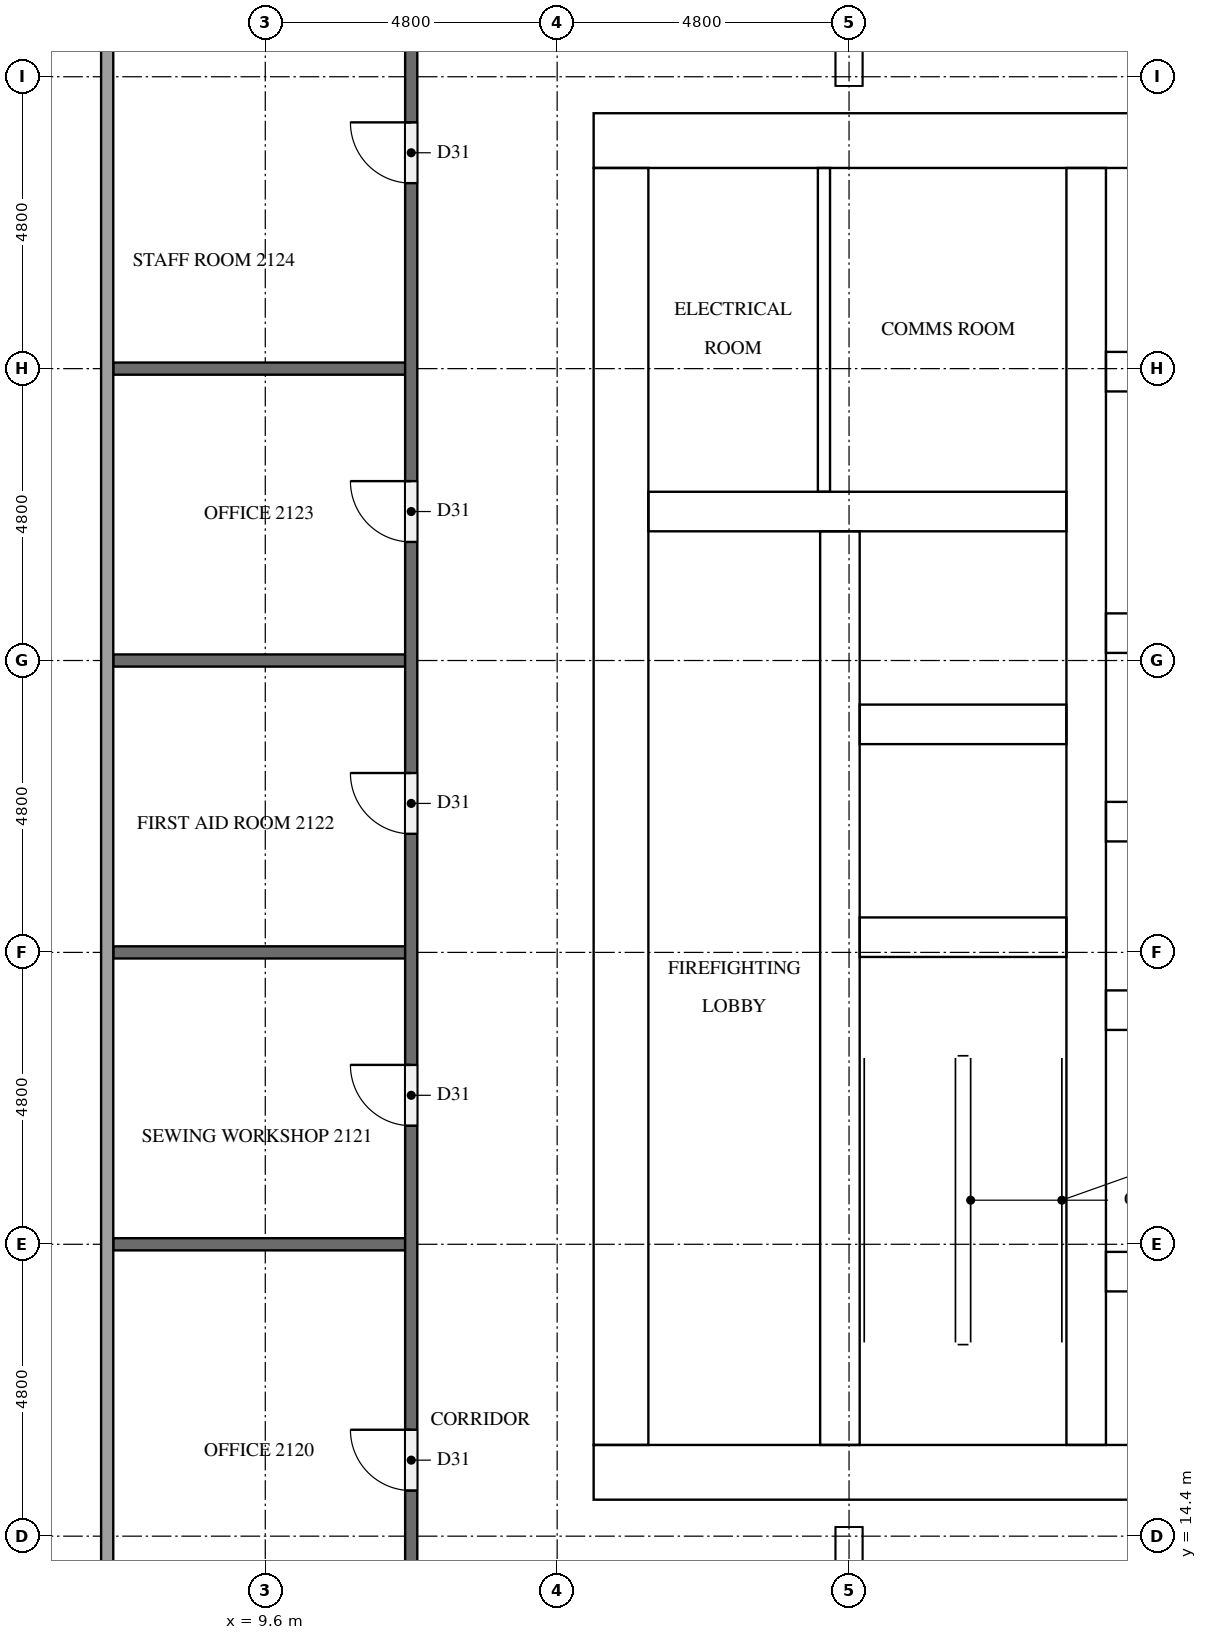
"""IFC4 building model, lengths in metres.
Left out: names, types, materials, properties, quantities, classifications, styles, units other than length and angle.
Written with IfcOpenShell. Run it as: python <this file> out.ifc"""

import sys

from ifc_helpers import new_model, si_unit, direction, frame, frame_2d, origin, place, context, subcontext, project, spatial, rectangle, extrude, element, fill, save


model = new_model("IFC4")
c1 = context("Model", 3, precision=1e-05, world=origin(), true_north=direction((0.0, 1.0)))
c2 = subcontext(c1, "Body", "Model", "MODEL_VIEW")
j1 = project(units=[si_unit("LENGTHUNIT", "METRE"), si_unit("PLANEANGLEUNIT", "RADIAN")], contexts=[c1])
p1 = place(None, origin())
s1 = spatial("IfcSite", under=j1, at=p1, CompositionType="ELEMENT")
p2 = place(p1, origin())
s2 = spatial("IfcBuilding", under=s1, at=p2, CompositionType="ELEMENT")
p3 = place(p2, frame((0.0, 0.0, 83.8)))
s3 = spatial("IfcBuildingStorey", under=s2, at=p3, CompositionType="ELEMENT", Elevation=83.8)
p4 = place(p3, frame((15.0, 15.45, 0.0), z_axis=(0.0, 0.0, 1.0), x_axis=(1.0, 0.0, 0.0)))
e1 = element("IfcWall", 1, at=p4, inside=s3, PredefinedType="SHEAR", context=c2, shape_type="SweptSolid", body=[
    extrude(rectangle(XDim=32.4, YDim=0.9, at=frame_2d((16.2, 0.0))), origin(), (0.0, 0.0, 1.0), 5.1),
])
p5 = place(p4, frame((15.3, 0.0, 0.0)))
e2 = element("IfcOpeningElement", 2, at=p5, cuts=e1, PredefinedType="OPENING", context=c2, shape_type="SweptSolid", body=[
    extrude(rectangle(XDim=1.8, YDim=2.1, at=frame_2d((0.9, 1.05))), frame((0.0, 0.46, 0.0), z_axis=(0.0, -1.0, 0.0), x_axis=(1.0, 0.0, 0.0)), (0.0, 0.0, 1.0), 0.92),
])
p6 = place(p3, frame((15.0, 37.35, 0.0), z_axis=(0.0, 0.0, 1.0), x_axis=(1.0, 0.0, 0.0)))
e3 = element("IfcWall", 3, at=p6, inside=s3, PredefinedType="SHEAR", context=c2, shape_type="SweptSolid", body=[
    extrude(rectangle(XDim=32.4, YDim=0.9, at=frame_2d((16.2, 0.0))), origin(), (0.0, 0.0, 1.0), 5.1),
])
p7 = place(p6, frame((15.3, 0.0, 0.0)))
e4 = element("IfcOpeningElement", 4, at=p7, cuts=e3, PredefinedType="OPENING", context=c2, shape_type="SweptSolid", body=[
    extrude(rectangle(XDim=1.8, YDim=2.1, at=frame_2d((0.9, 1.05))), frame((0.0, 0.46, 0.0), z_axis=(0.0, -1.0, 0.0), x_axis=(1.0, 0.0, 0.0)), (0.0, 0.0, 1.0), 0.92),
])
p8 = place(p6, frame((1.794, 0.0, 0.0)))
e5 = element("IfcOpeningElement", 5, at=p8, cuts=e3, PredefinedType="OPENING", context=c2, shape_type="SweptSolid", body=[
    extrude(rectangle(XDim=1.0, YDim=2.1, at=frame_2d((0.5, 1.05))), frame((0.0, 0.46, 0.0), z_axis=(0.0, -1.0, 0.0), x_axis=(1.0, 0.0, 0.0)), (0.0, 0.0, 1.0), 0.92),
])
p9 = place(p6, frame((5.331, 0.0, 0.0)))
e6 = element("IfcOpeningElement", 6, at=p9, cuts=e3, PredefinedType="OPENING", context=c2, shape_type="SweptSolid", body=[
    extrude(rectangle(XDim=1.0, YDim=2.1, at=frame_2d((0.5, 1.05))), frame((0.0, 0.46, 0.0), z_axis=(0.0, -1.0, 0.0), x_axis=(1.0, 0.0, 0.0)), (0.0, 0.0, 1.0), 0.92),
])
p10 = place(p3, frame((15.45, 15.9, 0.0), z_axis=(0.0, 0.0, 1.0), x_axis=(0.0, 1.0, 0.0)))
e7 = element("IfcWall", 7, at=p10, inside=s3, PredefinedType="SHEAR", context=c2, shape_type="SweptSolid", body=[
    extrude(rectangle(XDim=21.0, YDim=0.9, at=frame_2d((10.5, 0.0))), origin(), (0.0, 0.0, 1.0), 5.1),
])
p11 = place(p10, frame((4.86, 0.0, 0.0)))
e8 = element("IfcOpeningElement", 8, at=p11, cuts=e7, PredefinedType="OPENING", context=c2, shape_type="SweptSolid", body=[
    extrude(rectangle(XDim=1.2, YDim=2.1, at=frame_2d((0.6, 1.05))), frame((0.0, 0.46, 0.0), z_axis=(0.0, -1.0, 0.0), x_axis=(1.0, 0.0, 0.0)), (0.0, 0.0, 1.0), 0.92),
])
p12 = place(p3, frame((19.05, 15.9, 0.0), z_axis=(0.0, 0.0, 1.0), x_axis=(0.0, 1.0, 0.0)))
e9 = element("IfcWall", 9, at=p12, inside=s3, PredefinedType="SHEAR", context=c2, shape_type="SweptSolid", body=[
    extrude(rectangle(XDim=15.025, YDim=0.65, at=frame_2d((7.513, 0.0))), origin(), (0.0, 0.0, 1.0), 5.1),
])
p13 = place(p12, frame((9.55, 0.0, 0.0)))
e10 = element("IfcOpeningElement", 10, at=p13, cuts=e9, PredefinedType="OPENING", context=c2, shape_type="SweptSolid", body=[
    extrude(rectangle(XDim=1.1, YDim=2.1, at=frame_2d((0.55, 1.05))), frame((0.0, 0.335, 0.0), z_axis=(0.0, -1.0, 0.0), x_axis=(1.0, 0.0, 0.0)), (0.0, 0.0, 1.0), 0.67),
])
p14 = place(p12, frame((13.05, 0.0, 0.0)))
e11 = element("IfcOpeningElement", 11, at=p14, cuts=e9, PredefinedType="OPENING", context=c2, shape_type="SweptSolid", body=[
    extrude(rectangle(XDim=1.1, YDim=2.1, at=frame_2d((0.55, 1.05))), frame((0.0, 0.335, 0.0), z_axis=(0.0, -1.0, 0.0), x_axis=(1.0, 0.0, 0.0)), (0.0, 0.0, 1.0), 0.67),
])
p15 = place(p12, frame((0.3, 0.0, 0.0)))
e12 = element("IfcOpeningElement", 12, at=p15, cuts=e9, PredefinedType="OPENING", context=c2, shape_type="SweptSolid", body=[
    extrude(rectangle(XDim=1.2, YDim=2.1, at=frame_2d((0.6, 1.05))), frame((0.0, 0.335, 0.0), z_axis=(0.0, -1.0, 0.0), x_axis=(1.0, 0.0, 0.0)), (0.0, 0.0, 1.0), 0.67),
])
p16 = place(p3, frame((23.1, 15.9, 0.0), z_axis=(0.0, 0.0, 1.0), x_axis=(0.0, 1.0, 0.0)))
e13 = element("IfcWall", 13, at=p16, inside=s3, PredefinedType="SHEAR", context=c2, shape_type="SweptSolid", body=[
    extrude(rectangle(XDim=21.0, YDim=0.65, at=frame_2d((10.5, 0.0))), origin(), (0.0, 0.0, 1.0), 5.1),
])
for number, where, z_axis, x_axis in (
    (14, (19.375, 24.25, 0.0), (0.0, 0.0, 1.0), (1.0, 0.0, 0.0)),
    (15, (19.375, 27.75, 0.0), (0.0, 0.0, 1.0), (1.0, 0.0, 0.0)),
):
    element("IfcWall", number, at=place(p3, frame(where, z_axis=z_axis, x_axis=x_axis)), inside=s3, PredefinedType="SHEAR", context=c2, shape_type="SweptSolid", body=[
        extrude(rectangle(XDim=3.4, YDim=0.65, at=frame_2d((1.7, 0.0))), origin(), (0.0, 0.0, 1.0), 5.1),
    ])
p17 = place(p3, frame((15.9, 31.25, 0.0), z_axis=(0.0, 0.0, 1.0), x_axis=(1.0, 0.0, 0.0)))
e16 = element("IfcWall", 16, at=p17, inside=s3, PredefinedType="SHEAR", context=c2, shape_type="SweptSolid", body=[
    extrude(rectangle(XDim=6.875, YDim=0.65, at=frame_2d((3.438, 0.0))), origin(), (0.0, 0.0, 1.0), 5.1),
])
p18 = place(p3, frame((23.425, 18.75, 0.0), z_axis=(0.0, 0.0, 1.0), x_axis=(1.0, 0.0, 0.0)))
e17 = element("IfcWall", 17, at=p18, inside=s3, PredefinedType="SHEAR", context=c2, shape_type="SweptSolid", body=[
    extrude(rectangle(XDim=5.6, YDim=0.65, at=frame_2d((2.8, 0.0))), origin(), (0.0, 0.0, 1.0), 5.1),
])
p19 = place(p18, frame((0.637, 0.0, 0.0)))
e18 = element("IfcOpeningElement", 18, at=p19, cuts=e17, PredefinedType="OPENING", context=c2, shape_type="SweptSolid", body=[
    extrude(rectangle(XDim=1.1, YDim=2.1, at=frame_2d((0.55, 1.05))), frame((0.0, 0.335, 0.0), z_axis=(0.0, -1.0, 0.0), x_axis=(1.0, 0.0, 0.0)), (0.0, 0.0, 1.0), 0.67),
])
p20 = place(p18, frame((3.212, 0.0, 0.0)))
e19 = element("IfcOpeningElement", 19, at=p20, cuts=e17, PredefinedType="OPENING", context=c2, shape_type="SweptSolid", body=[
    extrude(rectangle(XDim=1.1, YDim=2.1, at=frame_2d((0.55, 1.05))), frame((0.0, 0.335, 0.0), z_axis=(0.0, -1.0, 0.0), x_axis=(1.0, 0.0, 0.0)), (0.0, 0.0, 1.0), 0.67),
])
p21 = place(p3, frame((23.425, 23.05, 0.0), z_axis=(0.0, 0.0, 1.0), x_axis=(1.0, 0.0, 0.0)))
e20 = element("IfcWall", 20, at=p21, inside=s3, PredefinedType="SHEAR", context=c2, shape_type="SweptSolid", body=[
    extrude(rectangle(XDim=15.55, YDim=0.65, at=frame_2d((7.775, 0.0))), origin(), (0.0, 0.0, 1.0), 5.1),
])
p22 = place(p21, frame((0.663, 0.0, 0.0)))
e21 = element("IfcOpeningElement", 21, at=p22, cuts=e20, PredefinedType="OPENING", context=c2, shape_type="SweptSolid", body=[
    extrude(rectangle(XDim=1.1, YDim=2.1, at=frame_2d((0.55, 1.05))), frame((0.0, 0.335, 0.0), z_axis=(0.0, -1.0, 0.0), x_axis=(1.0, 0.0, 0.0)), (0.0, 0.0, 1.0), 0.67),
])
p23 = place(p21, frame((3.288, 0.0, 0.0)))
e22 = element("IfcOpeningElement", 22, at=p23, cuts=e20, PredefinedType="OPENING", context=c2, shape_type="SweptSolid", body=[
    extrude(rectangle(XDim=1.1, YDim=2.1, at=frame_2d((0.55, 1.05))), frame((0.0, 0.335, 0.0), z_axis=(0.0, -1.0, 0.0), x_axis=(1.0, 0.0, 0.0)), (0.0, 0.0, 1.0), 0.67),
])
p24 = place(p21, frame((12.525, 0.0, 0.0)))
e23 = element("IfcOpeningElement", 23, at=p24, cuts=e20, PredefinedType="OPENING", context=c2, shape_type="SweptSolid", body=[
    extrude(rectangle(XDim=1.0, YDim=2.1, at=frame_2d((0.5, 1.05))), frame((0.0, 0.335, 0.0), z_axis=(0.0, -1.0, 0.0), x_axis=(1.0, 0.0, 0.0)), (0.0, 0.0, 1.0), 0.67),
])
p25 = place(p3, frame((23.425, 26.15, 0.0), z_axis=(0.0, 0.0, 1.0), x_axis=(1.0, 0.0, 0.0)))
e24 = element("IfcWall", 24, at=p25, inside=s3, PredefinedType="SHEAR", context=c2, shape_type="SweptSolid", body=[
    extrude(rectangle(XDim=15.55, YDim=0.65, at=frame_2d((7.775, 0.0))), origin(), (0.0, 0.0, 1.0), 5.1),
])
p26 = place(p3, frame((23.425, 29.25, 0.0), z_axis=(0.0, 0.0, 1.0), x_axis=(1.0, 0.0, 0.0)))
e25 = element("IfcWall", 25, at=p26, inside=s3, PredefinedType="SHEAR", context=c2, shape_type="SweptSolid", body=[
    extrude(rectangle(XDim=15.55, YDim=0.65, at=frame_2d((7.775, 0.0))), origin(), (0.0, 0.0, 1.0), 5.1),
])
p27 = place(p26, frame((3.337, 0.0, 0.0)))
e26 = element("IfcOpeningElement", 26, at=p27, cuts=e25, PredefinedType="OPENING", context=c2, shape_type="SweptSolid", body=[
    extrude(rectangle(XDim=1.0, YDim=2.1, at=frame_2d((0.5, 1.05))), frame((0.0, 0.335, 0.0), z_axis=(0.0, -1.0, 0.0), x_axis=(1.0, 0.0, 0.0)), (0.0, 0.0, 1.0), 0.67),
])
p28 = place(p26, frame((11.212, 0.0, 0.0)))
e27 = element("IfcOpeningElement", 27, at=p28, cuts=e25, PredefinedType="OPENING", context=c2, shape_type="SweptSolid", body=[
    extrude(rectangle(XDim=1.0, YDim=2.1, at=frame_2d((0.5, 1.05))), frame((0.0, 0.335, 0.0), z_axis=(0.0, -1.0, 0.0), x_axis=(1.0, 0.0, 0.0)), (0.0, 0.0, 1.0), 0.67),
])
p29 = place(p3, frame((23.425, 33.55, 0.0), z_axis=(0.0, 0.0, 1.0), x_axis=(1.0, 0.0, 0.0)))
e28 = element("IfcWall", 28, at=p29, inside=s3, PredefinedType="SHEAR", context=c2, shape_type="SweptSolid", body=[
    extrude(rectangle(XDim=5.6, YDim=0.65, at=frame_2d((2.8, 0.0))), origin(), (0.0, 0.0, 1.0), 5.1),
])
p30 = place(p3, frame((18.788, 31.575, 0.0), z_axis=(0.0, 0.0, 1.0), x_axis=(0.0, 1.0, 0.0)))
e29 = element("IfcWall", 29, at=p30, inside=s3, PredefinedType="PARTITIONING", context=c2, shape_type="SweptSolid", body=[
    extrude(rectangle(XDim=5.325, YDim=0.2, at=frame_2d((2.663, 0.0))), origin(), (0.0, 0.0, 1.0), 5.1),
])
for number, where, z_axis, x_axis in (
    (30, (7.1, 19.2, 0.0), (0.0, 0.0, 1.0), (1.0, 0.0, 0.0)),
    (31, (7.1, 24.0, 0.0), (0.0, 0.0, 1.0), (1.0, 0.0, 0.0)),
    (32, (7.1, 28.8, 0.0), (0.0, 0.0, 1.0), (1.0, 0.0, 0.0)),
    (33, (7.1, 33.6, 0.0), (0.0, 0.0, 1.0), (1.0, 0.0, 0.0)),
):
    element("IfcWall", number, at=place(p3, frame(where, z_axis=z_axis, x_axis=x_axis)), inside=s3, PredefinedType="PARTITIONING", context=c2, shape_type="SweptSolid", body=[
        extrude(rectangle(XDim=4.8, YDim=0.2, at=frame_2d((2.4, 0.0))), origin(), (0.0, 0.0, 1.0), 5.1),
    ])
p31 = place(p3, frame((12.0, 12.1, 0.0), z_axis=(0.0, 0.0, 1.0), x_axis=(0.0, 1.0, 0.0)))
e34 = element("IfcWall", 34, at=p31, inside=s3, PredefinedType="PARTITIONING", context=c2, shape_type="SweptSolid", body=[
    extrude(rectangle(XDim=28.6, YDim=0.2, at=frame_2d((14.3, 0.0))), origin(), (0.0, 0.0, 1.0), 5.1),
])
p32 = place(p31, frame((3.05, 0.0, 0.0)))
e35 = element("IfcOpeningElement", 35, at=p32, cuts=e34, PredefinedType="OPENING", context=c2, shape_type="SweptSolid", body=[
    extrude(rectangle(XDim=1.0, YDim=2.1, at=frame_2d((0.5, 1.05))), frame((0.0, 0.11, 0.0), z_axis=(0.0, -1.0, 0.0), x_axis=(1.0, 0.0, 0.0)), (0.0, 0.0, 1.0), 0.22),
])
p33 = place(p31, frame((9.05, 0.0, 0.0)))
e36 = element("IfcOpeningElement", 36, at=p33, cuts=e34, PredefinedType="OPENING", context=c2, shape_type="SweptSolid", body=[
    extrude(rectangle(XDim=1.0, YDim=2.1, at=frame_2d((0.5, 1.05))), frame((0.0, 0.11, 0.0), z_axis=(0.0, -1.0, 0.0), x_axis=(1.0, 0.0, 0.0)), (0.0, 0.0, 1.0), 0.22),
])
p34 = place(p31, frame((13.85, 0.0, 0.0)))
e37 = element("IfcOpeningElement", 37, at=p34, cuts=e34, PredefinedType="OPENING", context=c2, shape_type="SweptSolid", body=[
    extrude(rectangle(XDim=1.0, YDim=2.1, at=frame_2d((0.5, 1.05))), frame((0.0, 0.11, 0.0), z_axis=(0.0, -1.0, 0.0), x_axis=(1.0, 0.0, 0.0)), (0.0, 0.0, 1.0), 0.22),
])
p35 = place(p31, frame((18.65, 0.0, 0.0)))
e38 = element("IfcOpeningElement", 38, at=p35, cuts=e34, PredefinedType="OPENING", context=c2, shape_type="SweptSolid", body=[
    extrude(rectangle(XDim=1.0, YDim=2.1, at=frame_2d((0.5, 1.05))), frame((0.0, 0.11, 0.0), z_axis=(0.0, -1.0, 0.0), x_axis=(1.0, 0.0, 0.0)), (0.0, 0.0, 1.0), 0.22),
])
p36 = place(p31, frame((24.55, 0.0, 0.0)))
e39 = element("IfcOpeningElement", 39, at=p36, cuts=e34, PredefinedType="OPENING", context=c2, shape_type="SweptSolid", body=[
    extrude(rectangle(XDim=1.0, YDim=2.1, at=frame_2d((0.5, 1.05))), frame((0.0, 0.11, 0.0), z_axis=(0.0, -1.0, 0.0), x_axis=(1.0, 0.0, 0.0)), (0.0, 0.0, 1.0), 0.22),
])
p37 = place(p13, origin())
e40 = element("IfcDoor", 40, at=p37, inside=s3, OperationType="DOUBLE_DOOR_SLIDING", PredefinedType="DOOR", context=c2, shape_type="SweptSolid", body=[
    extrude(rectangle(XDim=1.1, YDim=2.1, at=frame_2d((0.55, 1.05))), frame((0.0, 0.025, 0.0), z_axis=(0.0, -1.0, 0.0), x_axis=(1.0, 0.0, 0.0)), (0.0, 0.0, 1.0), 0.05),
])
fill(e10, e40)
p38 = place(p14, origin())
e41 = element("IfcDoor", 41, at=p38, inside=s3, OperationType="DOUBLE_DOOR_SLIDING", PredefinedType="DOOR", context=c2, shape_type="SweptSolid", body=[
    extrude(rectangle(XDim=1.1, YDim=2.1, at=frame_2d((0.55, 1.05))), frame((0.0, 0.025, 0.0), z_axis=(0.0, -1.0, 0.0), x_axis=(1.0, 0.0, 0.0)), (0.0, 0.0, 1.0), 0.05),
])
fill(e11, e41)
p39 = place(p15, frame((1.2, 0.0, 0.0), z_axis=(0.0, 0.0, 1.0), x_axis=(-1.0, 0.0, 0.0)))
e42 = element("IfcDoor", 42, at=p39, inside=s3, OperationType="SINGLE_SWING_LEFT", PredefinedType="DOOR", context=c2, shape_type="SweptSolid", body=[
    extrude(rectangle(XDim=1.2, YDim=2.1, at=frame_2d((0.6, 1.05))), frame((0.0, 0.025, 0.0), z_axis=(0.0, -1.0, 0.0), x_axis=(1.0, 0.0, 0.0)), (0.0, 0.0, 1.0), 0.05),
])
fill(e12, e42)
p40 = place(p11, frame((1.2, 0.0, 0.0), z_axis=(0.0, 0.0, 1.0), x_axis=(-1.0, 0.0, 0.0)))
e43 = element("IfcDoor", 43, at=p40, inside=s3, OperationType="SINGLE_SWING_RIGHT", PredefinedType="DOOR", context=c2, shape_type="SweptSolid", body=[
    extrude(rectangle(XDim=1.2, YDim=2.1, at=frame_2d((0.6, 1.05))), frame((0.0, 0.025, 0.0), z_axis=(0.0, -1.0, 0.0), x_axis=(1.0, 0.0, 0.0)), (0.0, 0.0, 1.0), 0.05),
])
fill(e8, e43)
p41 = place(p8, origin())
e44 = element("IfcDoor", 44, at=p41, inside=s3, OperationType="SINGLE_SWING_RIGHT", PredefinedType="DOOR", context=c2, shape_type="SweptSolid", body=[
    extrude(rectangle(XDim=1.0, YDim=2.1, at=frame_2d((0.5, 1.05))), frame((0.0, 0.025, 0.0), z_axis=(0.0, -1.0, 0.0), x_axis=(1.0, 0.0, 0.0)), (0.0, 0.0, 1.0), 0.05),
])
fill(e5, e44)
p42 = place(p9, origin())
e45 = element("IfcDoor", 45, at=p42, inside=s3, OperationType="SINGLE_SWING_LEFT", PredefinedType="DOOR", context=c2, shape_type="SweptSolid", body=[
    extrude(rectangle(XDim=1.0, YDim=2.1, at=frame_2d((0.5, 1.05))), frame((0.0, 0.025, 0.0), z_axis=(0.0, -1.0, 0.0), x_axis=(1.0, 0.0, 0.0)), (0.0, 0.0, 1.0), 0.05),
])
fill(e6, e45)
p43 = place(p32, origin())
e46 = element("IfcDoor", 46, at=p43, inside=s3, OperationType="SINGLE_SWING_RIGHT", PredefinedType="DOOR", context=c2, shape_type="SweptSolid", body=[
    extrude(rectangle(XDim=1.0, YDim=2.1, at=frame_2d((0.5, 1.05))), frame((0.0, 0.025, 0.0), z_axis=(0.0, -1.0, 0.0), x_axis=(1.0, 0.0, 0.0)), (0.0, 0.0, 1.0), 0.05),
])
fill(e35, e46)
p44 = place(p33, origin())
e47 = element("IfcDoor", 47, at=p44, inside=s3, OperationType="SINGLE_SWING_RIGHT", PredefinedType="DOOR", context=c2, shape_type="SweptSolid", body=[
    extrude(rectangle(XDim=1.0, YDim=2.1, at=frame_2d((0.5, 1.05))), frame((0.0, 0.025, 0.0), z_axis=(0.0, -1.0, 0.0), x_axis=(1.0, 0.0, 0.0)), (0.0, 0.0, 1.0), 0.05),
])
fill(e36, e47)
p45 = place(p34, origin())
e48 = element("IfcDoor", 48, at=p45, inside=s3, OperationType="SINGLE_SWING_RIGHT", PredefinedType="DOOR", context=c2, shape_type="SweptSolid", body=[
    extrude(rectangle(XDim=1.0, YDim=2.1, at=frame_2d((0.5, 1.05))), frame((0.0, 0.025, 0.0), z_axis=(0.0, -1.0, 0.0), x_axis=(1.0, 0.0, 0.0)), (0.0, 0.0, 1.0), 0.05),
])
fill(e37, e48)
p46 = place(p35, origin())
e49 = element("IfcDoor", 49, at=p46, inside=s3, OperationType="SINGLE_SWING_RIGHT", PredefinedType="DOOR", context=c2, shape_type="SweptSolid", body=[
    extrude(rectangle(XDim=1.0, YDim=2.1, at=frame_2d((0.5, 1.05))), frame((0.0, 0.025, 0.0), z_axis=(0.0, -1.0, 0.0), x_axis=(1.0, 0.0, 0.0)), (0.0, 0.0, 1.0), 0.05),
])
fill(e38, e49)
p47 = place(p36, origin())
e50 = element("IfcDoor", 50, at=p47, inside=s3, OperationType="SINGLE_SWING_RIGHT", PredefinedType="DOOR", context=c2, shape_type="SweptSolid", body=[
    extrude(rectangle(XDim=1.0, YDim=2.1, at=frame_2d((0.5, 1.05))), frame((0.0, 0.025, 0.0), z_axis=(0.0, -1.0, 0.0), x_axis=(1.0, 0.0, 0.0)), (0.0, 0.0, 1.0), 0.05),
])
fill(e39, e50)
save(model, sys.argv[1])
